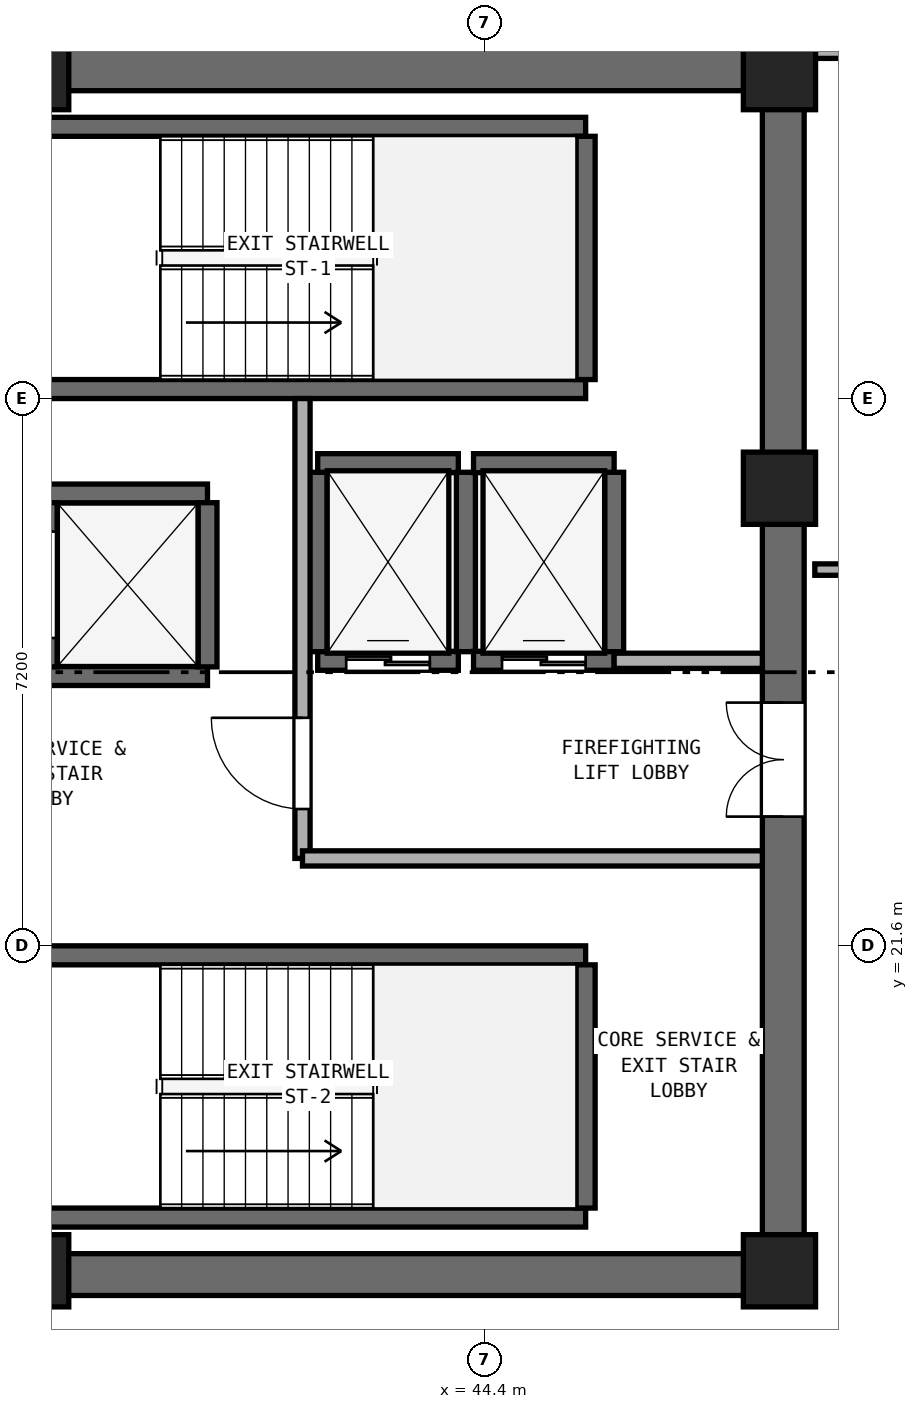
"""IFC4 building model, lengths in metres.
Left out: names, types, materials, properties, quantities, classifications, styles, units other than length and angle.
Written with IfcOpenShell. Run it as: python <this file> out.ifc"""

import sys

from ifc_helpers import new_model, si_unit, direction, frame, frame_2d, origin, origin_2d, place, context, subcontext, project, spatial, rectangle, extrude, element, fill, save


model = new_model("IFC4")
c1 = context("Model", 3, precision=1e-05, world=origin(), true_north=direction((0.0, 1.0)))
c2 = subcontext(c1, "Body", "Model", "MODEL_VIEW")
j1 = project(units=[si_unit("LENGTHUNIT", "METRE"), si_unit("PLANEANGLEUNIT", "RADIAN")], contexts=[c1])
p1 = place(None, origin())
s1 = spatial("IfcSite", under=j1, at=p1, CompositionType="ELEMENT")
p2 = place(p1, origin())
s2 = spatial("IfcBuilding", under=s1, at=p2, CompositionType="ELEMENT")
p3 = place(p2, frame((0.0, 0.0, 163.0)))
s3 = spatial("IfcBuildingStorey", under=s2, at=p3, CompositionType="ELEMENT", Elevation=163.0)
for number, where, z_axis, x_axis in (
    (1, (25.4, 17.275, 0.0), (0.0, 0.0, 1.0), (1.0, 0.0, 0.0)),
    (2, (25.4, 33.125, 0.0), (0.0, 0.0, 1.0), (1.0, 0.0, 0.0)),
):
    element("IfcWall", number, at=place(p3, frame(where, z_axis=z_axis, x_axis=x_axis)), inside=s3, PredefinedType="SHEAR", context=c2, shape_type="SweptSolid", body=[
        extrude(rectangle(XDim=23.2, YDim=0.55, at=frame_2d((11.6, 0.0))), origin(), (0.0, 0.0, 1.0), 3.54),
    ])
p4 = place(p3, frame((48.325, 17.55, 0.0), z_axis=(0.0, 0.0, 1.0), x_axis=(0.0, 1.0, 0.0)))
e3 = element("IfcWall", 3, at=p4, inside=s3, PredefinedType="SHEAR", context=c2, shape_type="SweptSolid", body=[
    extrude(rectangle(XDim=15.3, YDim=0.55, at=frame_2d((7.65, 0.0))), origin(), (0.0, 0.0, 1.0), 3.54),
])
p5 = place(p4, frame((5.75, 0.0, 0.0)))
e4 = element("IfcOpeningElement", 4, at=p5, cuts=e3, PredefinedType="OPENING", context=c2, shape_type="SweptSolid", body=[
    extrude(rectangle(XDim=1.5, YDim=2.15, at=frame_2d((0.75, 1.075))), frame((0.0, 0.285, 0.0), z_axis=(0.0, -1.0, 0.0), x_axis=(1.0, 0.0, 0.0)), (0.0, 0.0, 1.0), 0.57),
])
for number, where, z_axis, x_axis in (
    (5, (38.45, 17.325, 0.0), (0.0, 0.0, 1.0), (1.0, 0.0, 0.0)),
    (6, (48.275, 17.325, 0.0), (0.0, 0.0, 1.0), (1.0, 0.0, 0.0)),
    (7, (48.275, 27.62, 0.0), (0.0, 0.0, 1.0), (1.0, 0.0, 0.0)),
    (8, (48.275, 33.075, 0.0), (0.0, 0.0, 1.0), (1.0, 0.0, 0.0)),
    (9, (38.45, 33.075, 0.0), (0.0, 0.0, 1.0), (1.0, 0.0, 0.0)),
):
    element("IfcColumn", number, at=place(p3, frame(where, z_axis=z_axis, x_axis=x_axis)), inside=s3, PredefinedType="PILASTER", context=c2, shape_type="SweptSolid", body=[
        extrude(rectangle(XDim=0.95, YDim=0.95, at=origin_2d()), origin(), (0.0, 0.0, 1.0), 3.8),
    ])
for number, where, z_axis, x_axis in (
    (10, (38.425, 28.925, 0.0), (0.0, 0.0, 1.0), (1.0, 0.0, 0.0)),
    (11, (38.425, 32.375, 0.0), (0.0, 0.0, 1.0), (1.0, 0.0, 0.0)),
):
    element("IfcWall", number, at=place(p3, frame(where, z_axis=z_axis, x_axis=x_axis)), inside=s3, PredefinedType="SHEAR", context=c2, shape_type="SweptSolid", body=[
        extrude(rectangle(XDim=7.3, YDim=0.25, at=frame_2d((3.65, 0.0))), origin(), (0.0, 0.0, 1.0), 3.54),
    ])
p6 = place(p3, frame((45.725, 29.05, 0.0), z_axis=(0.0, 0.0, 1.0), x_axis=(0.0, 1.0, 0.0)))
e12 = element("IfcWall", 12, at=p6, inside=s3, PredefinedType="SHEAR", context=c2, shape_type="SweptSolid", body=[
    extrude(rectangle(XDim=3.2, YDim=0.25, at=frame_2d((1.6, 0.0))), origin(), (0.0, 0.0, 1.0), 3.54),
])
for number, where, z_axis, x_axis in (
    (13, (38.425, 18.025, 0.0), (0.0, 0.0, 1.0), (1.0, 0.0, 0.0)),
    (14, (38.425, 21.475, 0.0), (0.0, 0.0, 1.0), (1.0, 0.0, 0.0)),
):
    element("IfcWall", number, at=place(p3, frame(where, z_axis=z_axis, x_axis=x_axis)), inside=s3, PredefinedType="SHEAR", context=c2, shape_type="SweptSolid", body=[
        extrude(rectangle(XDim=7.3, YDim=0.25, at=frame_2d((3.65, 0.0))), origin(), (0.0, 0.0, 1.0), 3.54),
    ])
p7 = place(p3, frame((45.725, 18.15, 0.0), z_axis=(0.0, 0.0, 1.0), x_axis=(0.0, 1.0, 0.0)))
e15 = element("IfcWall", 15, at=p7, inside=s3, PredefinedType="SHEAR", context=c2, shape_type="SweptSolid", body=[
    extrude(rectangle(XDim=3.2, YDim=0.25, at=frame_2d((1.6, 0.0))), origin(), (0.0, 0.0, 1.0), 3.54),
])
p8 = place(p3, frame((42.2, 25.35, 0.0), z_axis=(0.0, 0.0, 1.0), x_axis=(1.0, 0.0, 0.0)))
e16 = element("IfcWall", 16, at=p8, inside=s3, PredefinedType="SHEAR", context=c2, shape_type="SweptSolid", body=[
    extrude(rectangle(XDim=1.85, YDim=0.25, at=frame_2d((0.925, 0.0))), origin(), (0.0, 0.0, 1.0), 3.54),
])
p9 = place(p8, frame((0.375, 0.0, 0.0)))
e17 = element("IfcOpeningElement", 17, at=p9, cuts=e16, PredefinedType="OPENING", context=c2, shape_type="SweptSolid", body=[
    extrude(rectangle(XDim=1.1, YDim=2.15, at=frame_2d((0.55, 1.075))), frame((0.0, 0.135, 0.0), z_axis=(0.0, -1.0, 0.0), x_axis=(1.0, 0.0, 0.0)), (0.0, 0.0, 1.0), 0.27),
])
p10 = place(p3, frame((42.2, 27.95, 0.0), z_axis=(0.0, 0.0, 1.0), x_axis=(1.0, 0.0, 0.0)))
e18 = element("IfcWall", 18, at=p10, inside=s3, PredefinedType="SHEAR", context=c2, shape_type="SweptSolid", body=[
    extrude(rectangle(XDim=1.85, YDim=0.25, at=frame_2d((0.925, 0.0))), origin(), (0.0, 0.0, 1.0), 3.54),
])
for number, where, z_axis, x_axis in (
    (19, (42.2, 25.47, 0.0), (0.0, 0.0, 1.0), (0.0, 1.0, 0.0)),
    (20, (44.15, 25.47, 0.0), (0.0, 0.0, 1.0), (0.0, 1.0, 0.0)),
):
    element("IfcWall", number, at=place(p3, frame(where, z_axis=z_axis, x_axis=x_axis)), inside=s3, PredefinedType="SHEAR", context=c2, shape_type="SweptSolid", body=[
        extrude(rectangle(XDim=2.36, YDim=0.25, at=frame_2d((1.18, 0.0))), origin(), (0.0, 0.0, 1.0), 3.54),
    ])
p11 = place(p3, frame((44.25, 25.35, 0.0), z_axis=(0.0, 0.0, 1.0), x_axis=(1.0, 0.0, 0.0)))
e21 = element("IfcWall", 21, at=p11, inside=s3, PredefinedType="SHEAR", context=c2, shape_type="SweptSolid", body=[
    extrude(rectangle(XDim=1.85, YDim=0.25, at=frame_2d((0.925, 0.0))), origin(), (0.0, 0.0, 1.0), 3.54),
])
p12 = place(p11, frame((0.375, 0.0, 0.0)))
e22 = element("IfcOpeningElement", 22, at=p12, cuts=e21, PredefinedType="OPENING", context=c2, shape_type="SweptSolid", body=[
    extrude(rectangle(XDim=1.1, YDim=2.15, at=frame_2d((0.55, 1.075))), frame((0.0, 0.135, 0.0), z_axis=(0.0, -1.0, 0.0), x_axis=(1.0, 0.0, 0.0)), (0.0, 0.0, 1.0), 0.27),
])
p13 = place(p3, frame((44.25, 27.95, 0.0), z_axis=(0.0, 0.0, 1.0), x_axis=(1.0, 0.0, 0.0)))
e23 = element("IfcWall", 23, at=p13, inside=s3, PredefinedType="SHEAR", context=c2, shape_type="SweptSolid", body=[
    extrude(rectangle(XDim=1.85, YDim=0.25, at=frame_2d((0.925, 0.0))), origin(), (0.0, 0.0, 1.0), 3.54),
])
p14 = place(p3, frame((46.1, 25.47, 0.0), z_axis=(0.0, 0.0, 1.0), x_axis=(0.0, 1.0, 0.0)))
e24 = element("IfcWall", 24, at=p14, inside=s3, PredefinedType="SHEAR", context=c2, shape_type="SweptSolid", body=[
    extrude(rectangle(XDim=2.36, YDim=0.25, at=frame_2d((1.18, 0.0))), origin(), (0.0, 0.0, 1.0), 3.54),
])
for number, where, z_axis, x_axis in (
    (25, (38.65, 25.15, 0.0), (0.0, 0.0, 1.0), (1.0, 0.0, 0.0)),
    (26, (38.65, 27.55, 0.0), (0.0, 0.0, 1.0), (1.0, 0.0, 0.0)),
):
    element("IfcWall", number, at=place(p3, frame(where, z_axis=z_axis, x_axis=x_axis)), inside=s3, PredefinedType="SHEAR", context=c2, shape_type="SweptSolid", body=[
        extrude(rectangle(XDim=2.1, YDim=0.25, at=frame_2d((1.05, 0.0))), origin(), (0.0, 0.0, 1.0), 3.54),
    ])
p15 = place(p3, frame((38.65, 25.27, 0.0), z_axis=(0.0, 0.0, 1.0), x_axis=(0.0, 1.0, 0.0)))
e27 = element("IfcWall", 27, at=p15, inside=s3, PredefinedType="SHEAR", context=c2, shape_type="SweptSolid", body=[
    extrude(rectangle(XDim=2.16, YDim=0.25, at=frame_2d((1.08, 0.0))), origin(), (0.0, 0.0, 1.0), 3.54),
])
p16 = place(p15, frame((0.38, 0.0, 0.0)))
e28 = element("IfcOpeningElement", 28, at=p16, cuts=e27, PredefinedType="OPENING", context=c2, shape_type="SweptSolid", body=[
    extrude(rectangle(XDim=1.4, YDim=2.2, at=frame_2d((0.7, 1.1))), frame((0.0, 0.135, 0.0), z_axis=(0.0, -1.0, 0.0), x_axis=(1.0, 0.0, 0.0)), (0.0, 0.0, 1.0), 0.27),
])
p17 = place(p3, frame((40.75, 25.27, 0.0), z_axis=(0.0, 0.0, 1.0), x_axis=(0.0, 1.0, 0.0)))
e29 = element("IfcWall", 29, at=p17, inside=s3, PredefinedType="SHEAR", context=c2, shape_type="SweptSolid", body=[
    extrude(rectangle(XDim=2.16, YDim=0.25, at=frame_2d((1.08, 0.0))), origin(), (0.0, 0.0, 1.0), 3.54),
])
p18 = place(p3, frame((42.0, 22.75, 0.0), z_axis=(0.0, 0.0, 1.0), x_axis=(0.0, 1.0, 0.0)))
e30 = element("IfcWall", 30, at=p18, inside=s3, PredefinedType="SOLIDWALL", context=c2, shape_type="SweptSolid", body=[
    extrude(rectangle(XDim=6.05, YDim=0.2, at=frame_2d((3.025, 0.0))), origin(), (0.0, 0.0, 1.0), 3.54),
])
p19 = place(p18, frame((0.65, 0.0, 0.0)))
e31 = element("IfcOpeningElement", 31, at=p19, cuts=e30, PredefinedType="OPENING", context=c2, shape_type="SweptSolid", body=[
    extrude(rectangle(XDim=1.2, YDim=2.15, at=frame_2d((0.6, 1.075))), frame((0.0, 0.11, 0.0), z_axis=(0.0, -1.0, 0.0), x_axis=(1.0, 0.0, 0.0)), (0.0, 0.0, 1.0), 0.22),
])
p20 = place(p3, frame((42.0, 22.75, 0.0), z_axis=(0.0, 0.0, 1.0), x_axis=(1.0, 0.0, 0.0)))
e32 = element("IfcWall", 32, at=p20, inside=s3, PredefinedType="SOLIDWALL", context=c2, shape_type="SweptSolid", body=[
    extrude(rectangle(XDim=6.05, YDim=0.2, at=frame_2d((3.025, 0.0))), origin(), (0.0, 0.0, 1.0), 3.54),
])
p21 = place(p3, frame((46.1, 25.35, 0.0), z_axis=(0.0, 0.0, 1.0), x_axis=(1.0, 0.0, 0.0)))
e33 = element("IfcWall", 33, at=p21, inside=s3, PredefinedType="SOLIDWALL", context=c2, shape_type="SweptSolid", body=[
    extrude(rectangle(XDim=1.95, YDim=0.2, at=frame_2d((0.975, 0.0))), origin(), (0.0, 0.0, 1.0), 3.54),
])
p22 = place(p3, frame((48.74, 26.55, 0.0), z_axis=(0.0, 0.0, 1.0), x_axis=(1.0, 0.0, 0.0)))
e34 = element("IfcWall", 34, at=p22, inside=s3, PredefinedType="PARTITIONING", context=c2, shape_type="SweptSolid", body=[
    extrude(rectangle(XDim=12.855, YDim=0.15, at=frame_2d((6.427, 0.0))), origin(), (0.0, 0.0, 1.0), 3.54),
])
p23 = place(p22, frame((5.927, 0.0, 0.0)))
e35 = element("IfcOpeningElement", 35, at=p23, cuts=e34, PredefinedType="OPENING", context=c2, shape_type="SweptSolid", body=[
    extrude(rectangle(XDim=1.0, YDim=2.12, at=frame_2d((0.5, 1.06))), frame((0.0, 0.085, 0.0), z_axis=(0.0, -1.0, 0.0), x_axis=(1.0, 0.0, 0.0)), (0.0, 0.0, 1.0), 0.17),
])
p24 = place(p3, frame((48.74, 33.35, 0.0), z_axis=(0.0, 0.0, 1.0), x_axis=(1.0, 0.0, 0.0)))
e36 = element("IfcWall", 36, at=p24, inside=s3, PredefinedType="PARTITIONING", context=c2, shape_type="SweptSolid", body=[
    extrude(rectangle(XDim=3.309, YDim=0.15, at=frame_2d((1.654, 0.0))), origin(), (0.0, 0.0, 1.0), 2.923),
])
p25 = place(p9, origin())
e37 = element("IfcDoor", 37, at=p25, inside=s3, OperationType="DOUBLE_DOOR_SLIDING", PredefinedType="DOOR", context=c2, shape_type="SweptSolid", body=[
    extrude(rectangle(XDim=1.1, YDim=2.15, at=frame_2d((0.55, 1.075))), frame((0.0, 0.025, 0.0), z_axis=(0.0, -1.0, 0.0), x_axis=(1.0, 0.0, 0.0)), (0.0, 0.0, 1.0), 0.05),
])
fill(e17, e37)
p26 = place(p12, origin())
e38 = element("IfcDoor", 38, at=p26, inside=s3, OperationType="DOUBLE_DOOR_SLIDING", PredefinedType="DOOR", context=c2, shape_type="SweptSolid", body=[
    extrude(rectangle(XDim=1.1, YDim=2.15, at=frame_2d((0.55, 1.075))), frame((0.0, 0.025, 0.0), z_axis=(0.0, -1.0, 0.0), x_axis=(1.0, 0.0, 0.0)), (0.0, 0.0, 1.0), 0.05),
])
fill(e22, e38)
p27 = place(p19, origin())
e39 = element("IfcDoor", 39, at=p27, inside=s3, OperationType="SINGLE_SWING_RIGHT", PredefinedType="DOOR", context=c2, shape_type="SweptSolid", body=[
    extrude(rectangle(XDim=1.2, YDim=2.15, at=frame_2d((0.6, 1.075))), frame((0.0, 0.025, 0.0), z_axis=(0.0, -1.0, 0.0), x_axis=(1.0, 0.0, 0.0)), (0.0, 0.0, 1.0), 0.05),
])
fill(e31, e39)
p28 = place(p5, origin())
e40 = element("IfcDoor", 40, at=p28, inside=s3, OperationType="DOUBLE_DOOR_SINGLE_SWING", PredefinedType="DOOR", context=c2, shape_type="SweptSolid", body=[
    extrude(rectangle(XDim=1.5, YDim=2.15, at=frame_2d((0.75, 1.075))), frame((0.0, 0.025, 0.0), z_axis=(0.0, -1.0, 0.0), x_axis=(1.0, 0.0, 0.0)), (0.0, 0.0, 1.0), 0.05),
])
fill(e4, e40)
save(model, sys.argv[1])
